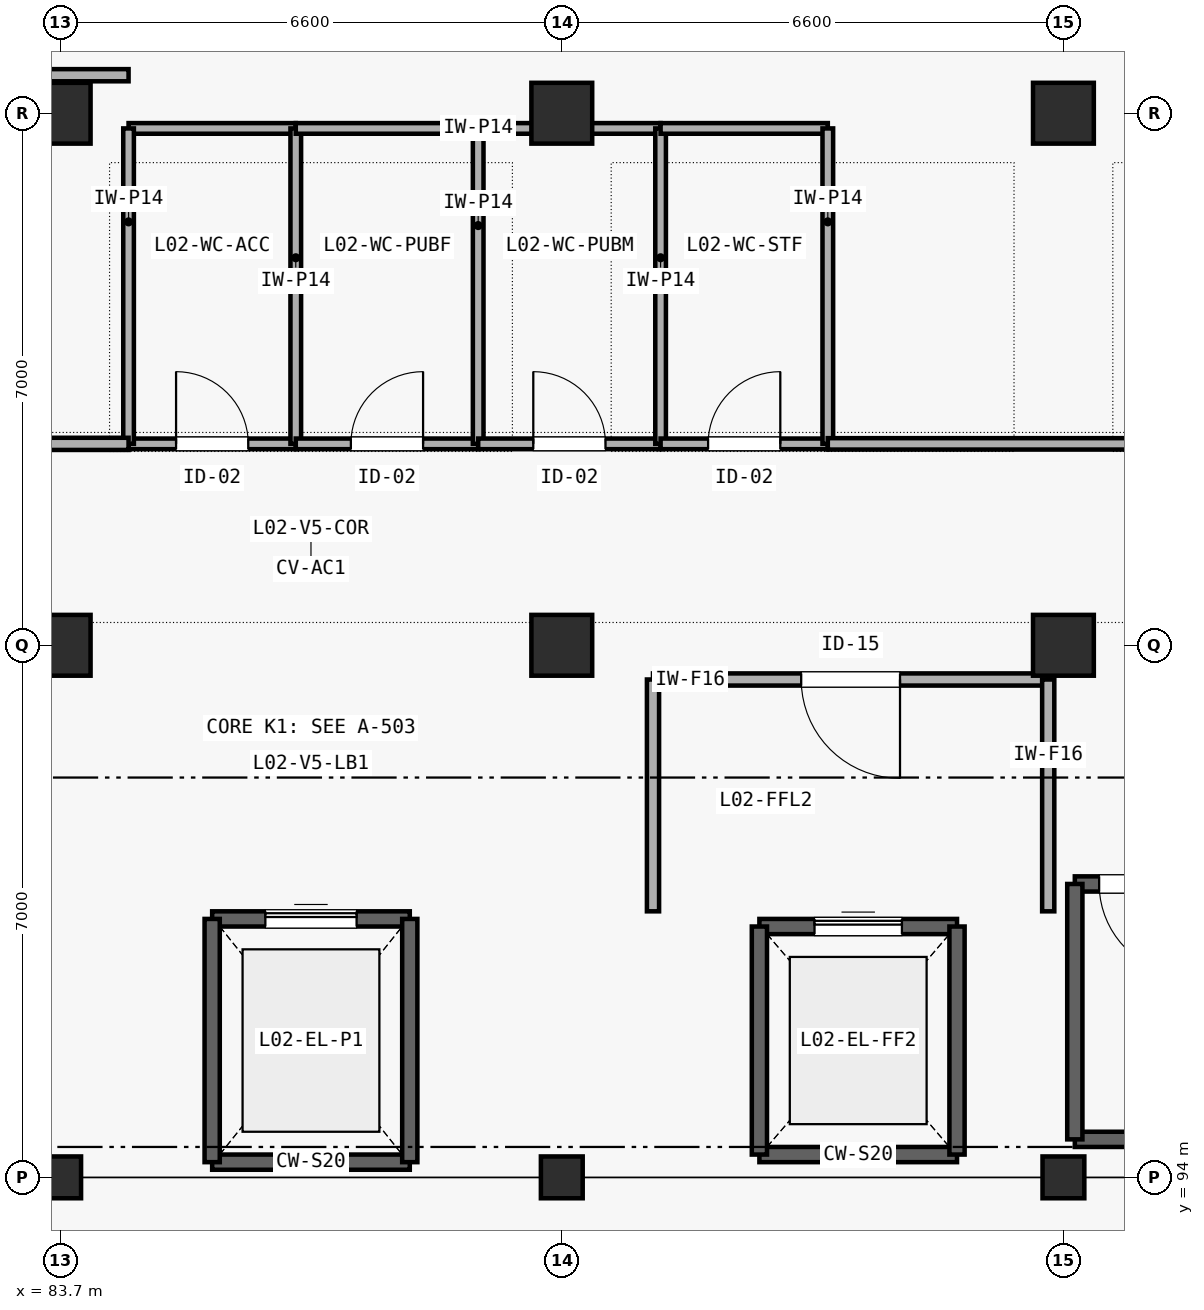
"""IFC4 building model, lengths in metres.
Left out: names, types, materials, properties, quantities, classifications, styles, units other than length and angle.
Written with IfcOpenShell. Run it as: python <this file> out.ifc"""

import sys

from ifc_helpers import new_model, si_unit, direction, frame, frame_2d, origin, origin_2d, place, context, subcontext, project, spatial, rectangle, extrude, element, fill, save


model = new_model("IFC4")
c1 = context("Model", 3, precision=1e-05, world=origin(), true_north=direction((0.0, 1.0)))
c2 = subcontext(c1, "Body", "Model", "MODEL_VIEW")
j1 = project(units=[si_unit("LENGTHUNIT", "METRE"), si_unit("PLANEANGLEUNIT", "RADIAN")], contexts=[c1])
p1 = place(None, origin())
s1 = spatial("IfcSite", under=j1, at=p1, CompositionType="ELEMENT")
p2 = place(p1, origin())
s2 = spatial("IfcBuilding", under=s1, at=p2, CompositionType="ELEMENT")
p3 = place(p2, frame((0.0, 0.0, 8.4)))
s3 = spatial("IfcBuildingStorey", under=s2, at=p3, CompositionType="ELEMENT", Elevation=8.4)
p4 = place(p3, frame((83.7, 94.0, 0.0), z_axis=(0.0, 0.0, 1.0), x_axis=(1.0, 0.0, 0.0)))
e1 = element("IfcColumn", 1, at=p4, inside=s3, PredefinedType="COLUMN", context=c2, shape_type="SweptSolid", body=[
    extrude(rectangle(XDim=0.55, YDim=0.55, at=origin_2d()), origin(), (0.0, 0.0, 1.0), 4.2),
])
for number, where, z_axis, x_axis in (
    (2, (83.7, 101.0, 0.0), (0.0, 0.0, 1.0), (1.0, 0.0, 0.0)),
    (3, (83.7, 108.0, 0.0), (0.0, 0.0, 1.0), (1.0, 0.0, 0.0)),
):
    element("IfcColumn", number, at=place(p3, frame(where, z_axis=z_axis, x_axis=x_axis)), inside=s3, PredefinedType="COLUMN", context=c2, shape_type="SweptSolid", body=[
        extrude(rectangle(XDim=0.8, YDim=0.8, at=origin_2d()), origin(), (0.0, 0.0, 1.0), 4.2),
    ])
p5 = place(p3, frame((90.3, 94.0, 0.0), z_axis=(0.0, 0.0, 1.0), x_axis=(1.0, 0.0, 0.0)))
e4 = element("IfcColumn", 4, at=p5, inside=s3, PredefinedType="COLUMN", context=c2, shape_type="SweptSolid", body=[
    extrude(rectangle(XDim=0.55, YDim=0.55, at=origin_2d()), origin(), (0.0, 0.0, 1.0), 4.2),
])
for number, where, z_axis, x_axis in (
    (5, (90.3, 101.0, 0.0), (0.0, 0.0, 1.0), (1.0, 0.0, 0.0)),
    (6, (90.3, 108.0, 0.0), (0.0, 0.0, 1.0), (1.0, 0.0, 0.0)),
):
    element("IfcColumn", number, at=place(p3, frame(where, z_axis=z_axis, x_axis=x_axis)), inside=s3, PredefinedType="COLUMN", context=c2, shape_type="SweptSolid", body=[
        extrude(rectangle(XDim=0.8, YDim=0.8, at=origin_2d()), origin(), (0.0, 0.0, 1.0), 4.2),
    ])
p6 = place(p3, frame((96.9, 94.0, 0.0), z_axis=(0.0, 0.0, 1.0), x_axis=(1.0, 0.0, 0.0)))
e7 = element("IfcColumn", 7, at=p6, inside=s3, PredefinedType="COLUMN", context=c2, shape_type="SweptSolid", body=[
    extrude(rectangle(XDim=0.55, YDim=0.55, at=origin_2d()), origin(), (0.0, 0.0, 1.0), 4.2),
])
for number, where, z_axis, x_axis in (
    (8, (96.9, 101.0, 0.0), (0.0, 0.0, 1.0), (1.0, 0.0, 0.0)),
    (9, (96.9, 108.0, 0.0), (0.0, 0.0, 1.0), (1.0, 0.0, 0.0)),
):
    element("IfcColumn", number, at=place(p3, frame(where, z_axis=z_axis, x_axis=x_axis)), inside=s3, PredefinedType="COLUMN", context=c2, shape_type="SweptSolid", body=[
        extrude(rectangle(XDim=0.8, YDim=0.8, at=origin_2d()), origin(), (0.0, 0.0, 1.0), 4.2),
    ])
p7 = place(p3, frame((97.05, 94.5, 0.0), z_axis=(0.0, 0.0, 1.0), x_axis=(1.0, 0.0, 0.0)))
e10 = element("IfcWall", 10, at=p7, inside=s3, PredefinedType="SHEAR", context=c2, shape_type="SweptSolid", body=[
    extrude(rectangle(XDim=6.3, YDim=0.2, at=frame_2d((3.15, 0.0))), origin(), (0.0, 0.0, 1.0), 4.2),
])
p8 = place(p3, frame((97.05, 97.86, 0.0), z_axis=(0.0, 0.0, 1.0), x_axis=(1.0, 0.0, 0.0)))
e11 = element("IfcWall", 11, at=p8, inside=s3, PredefinedType="SHEAR", context=c2, shape_type="SweptSolid", body=[
    extrude(rectangle(XDim=6.3, YDim=0.2, at=frame_2d((3.15, 0.0))), origin(), (0.0, 0.0, 1.0), 4.2),
])
p9 = place(p8, frame((0.32, 0.0, 0.0)))
e12 = element("IfcOpeningElement", 12, at=p9, cuts=e11, PredefinedType="OPENING", context=c2, shape_type="SweptSolid", body=[
    extrude(rectangle(XDim=1.2, YDim=2.15, at=frame_2d((0.6, 1.075))), frame((0.0, 0.11, 0.0), z_axis=(0.0, -1.0, 0.0), x_axis=(1.0, 0.0, 0.0)), (0.0, 0.0, 1.0), 0.22),
])
p10 = place(p3, frame((97.05, 94.5, 0.0), z_axis=(0.0, 0.0, 1.0), x_axis=(0.0, 1.0, 0.0)))
e13 = element("IfcWall", 13, at=p10, inside=s3, PredefinedType="SHEAR", context=c2, shape_type="SweptSolid", body=[
    extrude(rectangle(XDim=3.36, YDim=0.2, at=frame_2d((1.68, 0.0))), origin(), (0.0, 0.0, 1.0), 4.2),
])
p11 = place(p3, frame((92.9, 94.3, 0.0), z_axis=(0.0, 0.0, 1.0), x_axis=(1.0, 0.0, 0.0)))
e14 = element("IfcWall", 14, at=p11, inside=s3, PredefinedType="SHEAR", context=c2, shape_type="SweptSolid", body=[
    extrude(rectangle(XDim=2.6, YDim=0.2, at=frame_2d((1.3, 0.0))), origin(), (0.0, 0.0, 1.0), 4.2),
])
p12 = place(p3, frame((92.9, 97.3, 0.0), z_axis=(0.0, 0.0, 1.0), x_axis=(1.0, 0.0, 0.0)))
e15 = element("IfcWall", 15, at=p12, inside=s3, PredefinedType="SHEAR", context=c2, shape_type="SweptSolid", body=[
    extrude(rectangle(XDim=2.6, YDim=0.2, at=frame_2d((1.3, 0.0))), origin(), (0.0, 0.0, 1.0), 4.2),
])
p13 = place(p12, frame((0.725, 0.0, 0.0)))
e16 = element("IfcOpeningElement", 16, at=p13, cuts=e15, PredefinedType="OPENING", context=c2, shape_type="SweptSolid", body=[
    extrude(rectangle(XDim=1.15, YDim=2.2, at=frame_2d((0.575, 1.1))), frame((0.0, 0.11, 0.0), z_axis=(0.0, -1.0, 0.0), x_axis=(1.0, 0.0, 0.0)), (0.0, 0.0, 1.0), 0.22),
])
for number, where, z_axis, x_axis in (
    (17, (92.9, 94.3, 0.0), (0.0, 0.0, 1.0), (0.0, 1.0, 0.0)),
    (18, (95.5, 94.3, 0.0), (0.0, 0.0, 1.0), (0.0, 1.0, 0.0)),
):
    element("IfcWall", number, at=place(p3, frame(where, z_axis=z_axis, x_axis=x_axis)), inside=s3, PredefinedType="SHEAR", context=c2, shape_type="SweptSolid", body=[
        extrude(rectangle(XDim=3.0, YDim=0.2, at=frame_2d((1.5, 0.0))), origin(), (0.0, 0.0, 1.0), 4.2),
    ])
p14 = place(p3, frame((85.7, 94.2, 0.0), z_axis=(0.0, 0.0, 1.0), x_axis=(1.0, 0.0, 0.0)))
e19 = element("IfcWall", 19, at=p14, inside=s3, PredefinedType="SHEAR", context=c2, shape_type="SweptSolid", body=[
    extrude(rectangle(XDim=2.6, YDim=0.2, at=frame_2d((1.3, 0.0))), origin(), (0.0, 0.0, 1.0), 4.2),
])
p15 = place(p3, frame((85.7, 97.4, 0.0), z_axis=(0.0, 0.0, 1.0), x_axis=(1.0, 0.0, 0.0)))
e20 = element("IfcWall", 20, at=p15, inside=s3, PredefinedType="SHEAR", context=c2, shape_type="SweptSolid", body=[
    extrude(rectangle(XDim=2.6, YDim=0.2, at=frame_2d((1.3, 0.0))), origin(), (0.0, 0.0, 1.0), 4.2),
])
p16 = place(p15, frame((0.7, 0.0, 0.0)))
e21 = element("IfcOpeningElement", 21, at=p16, cuts=e20, PredefinedType="OPENING", context=c2, shape_type="SweptSolid", body=[
    extrude(rectangle(XDim=1.2, YDim=2.2, at=frame_2d((0.6, 1.1))), frame((0.0, 0.11, 0.0), z_axis=(0.0, -1.0, 0.0), x_axis=(1.0, 0.0, 0.0)), (0.0, 0.0, 1.0), 0.22),
])
for number, where, z_axis, x_axis in (
    (22, (85.7, 94.2, 0.0), (0.0, 0.0, 1.0), (0.0, 1.0, 0.0)),
    (23, (88.3, 94.2, 0.0), (0.0, 0.0, 1.0), (0.0, 1.0, 0.0)),
):
    element("IfcWall", number, at=place(p3, frame(where, z_axis=z_axis, x_axis=x_axis)), inside=s3, PredefinedType="SHEAR", context=c2, shape_type="SweptSolid", body=[
        extrude(rectangle(XDim=3.2, YDim=0.2, at=frame_2d((1.6, 0.0))), origin(), (0.0, 0.0, 1.0), 4.2),
    ])
p17 = place(p3, frame((91.5, 100.55, 0.0), z_axis=(0.0, 0.0, 1.0), x_axis=(1.0, 0.0, 0.0)))
e24 = element("IfcWall", 24, at=p17, inside=s3, PredefinedType="SOLIDWALL", context=c2, shape_type="SweptSolid", body=[
    extrude(rectangle(XDim=5.2, YDim=0.16, at=frame_2d((2.6, 0.0))), origin(), (0.0, 0.0, 1.0), 3.9),
])
p18 = place(p17, frame((1.95, 0.0, 0.0)))
e25 = element("IfcOpeningElement", 25, at=p18, cuts=e24, PredefinedType="OPENING", context=c2, shape_type="SweptSolid", body=[
    extrude(rectangle(XDim=1.3, YDim=2.15, at=frame_2d((0.65, 1.075))), frame((0.0, 0.09, 0.0), z_axis=(0.0, -1.0, 0.0), x_axis=(1.0, 0.0, 0.0)), (0.0, 0.0, 1.0), 0.18),
])
p19 = place(p3, frame((91.5, 97.5, 0.0), z_axis=(0.0, 0.0, 1.0), x_axis=(0.0, 1.0, 0.0)))
e26 = element("IfcWall", 26, at=p19, inside=s3, PredefinedType="SOLIDWALL", context=c2, shape_type="SweptSolid", body=[
    extrude(rectangle(XDim=3.05, YDim=0.16, at=frame_2d((1.525, 0.0))), origin(), (0.0, 0.0, 1.0), 3.9),
])
p20 = place(p3, frame((96.7, 97.5, 0.0), z_axis=(0.0, 0.0, 1.0), x_axis=(0.0, 1.0, 0.0)))
e27 = element("IfcWall", 27, at=p20, inside=s3, PredefinedType="SOLIDWALL", context=c2, shape_type="SweptSolid", body=[
    extrude(rectangle(XDim=3.05, YDim=0.16, at=frame_2d((1.525, 0.0))), origin(), (0.0, 0.0, 1.0), 3.405),
])
p21 = place(p3, frame((84.6, 103.65, 0.0), z_axis=(0.0, 0.0, 1.0), x_axis=(1.0, 0.0, 0.0)))
e28 = element("IfcWall", 28, at=p21, inside=s3, PredefinedType="PLUMBINGWALL", context=c2, shape_type="SweptSolid", body=[
    extrude(rectangle(XDim=2.2, YDim=0.14, at=frame_2d((1.1, 0.0))), origin(), (0.0, 0.0, 1.0), 3.9),
])
p22 = place(p21, frame((0.625, 0.0, 0.0)))
e29 = element("IfcOpeningElement", 29, at=p22, cuts=e28, PredefinedType="OPENING", context=c2, shape_type="SweptSolid", body=[
    extrude(rectangle(XDim=0.95, YDim=2.1, at=frame_2d((0.475, 1.05))), frame((0.0, 0.08, 0.0), z_axis=(0.0, -1.0, 0.0), x_axis=(1.0, 0.0, 0.0)), (0.0, 0.0, 1.0), 0.16),
])
p23 = place(p3, frame((84.6, 107.8, 0.0), z_axis=(0.0, 0.0, 1.0), x_axis=(1.0, 0.0, 0.0)))
e30 = element("IfcWall", 30, at=p23, inside=s3, PredefinedType="PLUMBINGWALL", context=c2, shape_type="SweptSolid", body=[
    extrude(rectangle(XDim=2.2, YDim=0.14, at=frame_2d((1.1, 0.0))), origin(), (0.0, 0.0, 1.0), 3.365),
])
for number, where, z_axis, x_axis in (
    (31, (84.6, 103.65, 0.0), (0.0, 0.0, 1.0), (0.0, 1.0, 0.0)),
    (32, (86.8, 103.65, 0.0), (0.0, 0.0, 1.0), (0.0, 1.0, 0.0)),
):
    element("IfcWall", number, at=place(p3, frame(where, z_axis=z_axis, x_axis=x_axis)), inside=s3, PredefinedType="PLUMBINGWALL", context=c2, shape_type="SweptSolid", body=[
        extrude(rectangle(XDim=4.15, YDim=0.14, at=frame_2d((2.075, 0.0))), origin(), (0.0, 0.0, 1.0), 3.9),
    ])
p24 = place(p3, frame((86.8, 103.65, 0.0), z_axis=(0.0, 0.0, 1.0), x_axis=(1.0, 0.0, 0.0)))
e33 = element("IfcWall", 33, at=p24, inside=s3, PredefinedType="PLUMBINGWALL", context=c2, shape_type="SweptSolid", body=[
    extrude(rectangle(XDim=2.4, YDim=0.14, at=frame_2d((1.2, 0.0))), origin(), (0.0, 0.0, 1.0), 3.9),
])
p25 = place(p24, frame((0.725, 0.0, 0.0)))
e34 = element("IfcOpeningElement", 34, at=p25, cuts=e33, PredefinedType="OPENING", context=c2, shape_type="SweptSolid", body=[
    extrude(rectangle(XDim=0.95, YDim=2.1, at=frame_2d((0.475, 1.05))), frame((0.0, 0.08, 0.0), z_axis=(0.0, -1.0, 0.0), x_axis=(1.0, 0.0, 0.0)), (0.0, 0.0, 1.0), 0.16),
])
p26 = place(p3, frame((86.8, 107.8, 0.0), z_axis=(0.0, 0.0, 1.0), x_axis=(1.0, 0.0, 0.0)))
e35 = element("IfcWall", 35, at=p26, inside=s3, PredefinedType="PLUMBINGWALL", context=c2, shape_type="SweptSolid", body=[
    extrude(rectangle(XDim=2.4, YDim=0.14, at=frame_2d((1.2, 0.0))), origin(), (0.0, 0.0, 1.0), 3.365),
])
p27 = place(p3, frame((89.2, 103.65, 0.0), z_axis=(0.0, 0.0, 1.0), x_axis=(0.0, 1.0, 0.0)))
e36 = element("IfcWall", 36, at=p27, inside=s3, PredefinedType="PLUMBINGWALL", context=c2, shape_type="SweptSolid", body=[
    extrude(rectangle(XDim=4.15, YDim=0.14, at=frame_2d((2.075, 0.0))), origin(), (0.0, 0.0, 1.0), 3.9),
])
p28 = place(p3, frame((89.2, 103.65, 0.0), z_axis=(0.0, 0.0, 1.0), x_axis=(1.0, 0.0, 0.0)))
e37 = element("IfcWall", 37, at=p28, inside=s3, PredefinedType="PLUMBINGWALL", context=c2, shape_type="SweptSolid", body=[
    extrude(rectangle(XDim=2.4, YDim=0.14, at=frame_2d((1.2, 0.0))), origin(), (0.0, 0.0, 1.0), 3.9),
])
p29 = place(p28, frame((0.725, 0.0, 0.0)))
e38 = element("IfcOpeningElement", 38, at=p29, cuts=e37, PredefinedType="OPENING", context=c2, shape_type="SweptSolid", body=[
    extrude(rectangle(XDim=0.95, YDim=2.1, at=frame_2d((0.475, 1.05))), frame((0.0, 0.08, 0.0), z_axis=(0.0, -1.0, 0.0), x_axis=(1.0, 0.0, 0.0)), (0.0, 0.0, 1.0), 0.16),
])
p30 = place(p3, frame((89.2, 107.8, 0.0), z_axis=(0.0, 0.0, 1.0), x_axis=(1.0, 0.0, 0.0)))
e39 = element("IfcWall", 39, at=p30, inside=s3, PredefinedType="PLUMBINGWALL", context=c2, shape_type="SweptSolid", body=[
    extrude(rectangle(XDim=2.4, YDim=0.14, at=frame_2d((1.2, 0.0))), origin(), (0.0, 0.0, 1.0), 3.365),
])
p31 = place(p3, frame((91.6, 103.65, 0.0), z_axis=(0.0, 0.0, 1.0), x_axis=(0.0, 1.0, 0.0)))
e40 = element("IfcWall", 40, at=p31, inside=s3, PredefinedType="PLUMBINGWALL", context=c2, shape_type="SweptSolid", body=[
    extrude(rectangle(XDim=4.15, YDim=0.14, at=frame_2d((2.075, 0.0))), origin(), (0.0, 0.0, 1.0), 3.9),
])
p32 = place(p3, frame((91.6, 103.65, 0.0), z_axis=(0.0, 0.0, 1.0), x_axis=(1.0, 0.0, 0.0)))
e41 = element("IfcWall", 41, at=p32, inside=s3, PredefinedType="PLUMBINGWALL", context=c2, shape_type="SweptSolid", body=[
    extrude(rectangle(XDim=2.2, YDim=0.14, at=frame_2d((1.1, 0.0))), origin(), (0.0, 0.0, 1.0), 3.9),
])
p33 = place(p32, frame((0.625, 0.0, 0.0)))
e42 = element("IfcOpeningElement", 42, at=p33, cuts=e41, PredefinedType="OPENING", context=c2, shape_type="SweptSolid", body=[
    extrude(rectangle(XDim=0.95, YDim=2.1, at=frame_2d((0.475, 1.05))), frame((0.0, 0.08, 0.0), z_axis=(0.0, -1.0, 0.0), x_axis=(1.0, 0.0, 0.0)), (0.0, 0.0, 1.0), 0.16),
])
p34 = place(p3, frame((91.6, 107.8, 0.0), z_axis=(0.0, 0.0, 1.0), x_axis=(1.0, 0.0, 0.0)))
e43 = element("IfcWall", 43, at=p34, inside=s3, PredefinedType="PLUMBINGWALL", context=c2, shape_type="SweptSolid", body=[
    extrude(rectangle(XDim=2.2, YDim=0.14, at=frame_2d((1.1, 0.0))), origin(), (0.0, 0.0, 1.0), 3.365),
])
p35 = place(p3, frame((93.8, 103.65, 0.0), z_axis=(0.0, 0.0, 1.0), x_axis=(0.0, 1.0, 0.0)))
e44 = element("IfcWall", 44, at=p35, inside=s3, PredefinedType="PLUMBINGWALL", context=c2, shape_type="SweptSolid", body=[
    extrude(rectangle(XDim=4.15, YDim=0.14, at=frame_2d((2.075, 0.0))), origin(), (0.0, 0.0, 1.0), 3.9),
])
p36 = place(p3, frame((75.5, 103.65, 0.0), z_axis=(0.0, 0.0, 1.0), x_axis=(1.0, 0.0, 0.0)))
e45 = element("IfcWall", 45, at=p36, inside=s3, PredefinedType="SOLIDWALL", context=c2, shape_type="SweptSolid", body=[
    extrude(rectangle(XDim=9.1, YDim=0.16, at=frame_2d((4.55, 0.0))), origin(), (0.0, 0.0, 1.0), 3.9),
])
p37 = place(p36, frame((4.0, 0.0, 0.0)))
e46 = element("IfcOpeningElement", 46, at=p37, cuts=e45, PredefinedType="OPENING", context=c2, shape_type="SweptSolid", body=[
    extrude(rectangle(XDim=1.1, YDim=2.2, at=frame_2d((0.55, 1.1))), frame((0.0, 0.09, 0.0), z_axis=(0.0, -1.0, 0.0), x_axis=(1.0, 0.0, 0.0)), (0.0, 0.0, 1.0), 0.18),
])
p38 = place(p3, frame((75.5, 108.5, 0.0), z_axis=(0.0, 0.0, 1.0), x_axis=(1.0, 0.0, 0.0)))
e47 = element("IfcWall", 47, at=p38, inside=s3, PredefinedType="SOLIDWALL", context=c2, shape_type="SweptSolid", body=[
    extrude(rectangle(XDim=9.1, YDim=0.16, at=frame_2d((4.55, 0.0))), origin(), (0.0, 0.0, 1.0), 3.9),
])
p39 = place(p3, frame((93.8, 103.65, 0.0), z_axis=(0.0, 0.0, 1.0), x_axis=(1.0, 0.0, 0.0)))
e48 = element("IfcWall", 48, at=p39, inside=s3, PredefinedType="PARTITIONING", context=c2, shape_type="SweptSolid", body=[
    extrude(rectangle(XDim=14.0, YDim=0.15, at=frame_2d((7.0, 0.0))), origin(), (0.0, 0.0, 1.0), 3.9),
])
p40 = place(p39, frame((6.425, 0.0, 0.0)))
e49 = element("IfcOpeningElement", 49, at=p40, cuts=e48, PredefinedType="OPENING", context=c2, shape_type="SweptSolid", body=[
    extrude(rectangle(XDim=1.15, YDim=2.15, at=frame_2d((0.575, 1.075))), frame((0.0, 0.085, 0.0), z_axis=(0.0, -1.0, 0.0), x_axis=(1.0, 0.0, 0.0)), (0.0, 0.0, 1.0), 0.17),
])
p41 = place(p9, frame((1.2, 0.0, 0.0), z_axis=(0.0, 0.0, 1.0), x_axis=(-1.0, 0.0, 0.0)))
e50 = element("IfcDoor", 50, at=p41, inside=s3, OperationType="SINGLE_SWING_LEFT", PredefinedType="DOOR", context=c2, shape_type="SweptSolid", body=[
    extrude(rectangle(XDim=1.2, YDim=2.15, at=frame_2d((0.6, 1.075))), frame((0.0, 0.025, 0.0), z_axis=(0.0, -1.0, 0.0), x_axis=(1.0, 0.0, 0.0)), (0.0, 0.0, 1.0), 0.05),
])
fill(e12, e50)
p42 = place(p13, origin())
e51 = element("IfcDoor", 51, at=p42, inside=s3, OperationType="SLIDING_TO_LEFT", PredefinedType="DOOR", context=c2, shape_type="SweptSolid", body=[
    extrude(rectangle(XDim=1.15, YDim=2.2, at=frame_2d((0.575, 1.1))), frame((0.0, 0.025, 0.0), z_axis=(0.0, -1.0, 0.0), x_axis=(1.0, 0.0, 0.0)), (0.0, 0.0, 1.0), 0.05),
])
fill(e16, e51)
p43 = place(p16, origin())
e52 = element("IfcDoor", 52, at=p43, inside=s3, OperationType="SLIDING_TO_LEFT", PredefinedType="DOOR", context=c2, shape_type="SweptSolid", body=[
    extrude(rectangle(XDim=1.2, YDim=2.2, at=frame_2d((0.6, 1.1))), frame((0.0, 0.025, 0.0), z_axis=(0.0, -1.0, 0.0), x_axis=(1.0, 0.0, 0.0)), (0.0, 0.0, 1.0), 0.05),
])
fill(e21, e52)
p44 = place(p18, frame((1.3, 0.0, 0.0), z_axis=(0.0, 0.0, 1.0), x_axis=(-1.0, 0.0, 0.0)))
e53 = element("IfcDoor", 53, at=p44, inside=s3, OperationType="SINGLE_SWING_LEFT", PredefinedType="DOOR", context=c2, shape_type="SweptSolid", body=[
    extrude(rectangle(XDim=1.3, YDim=2.15, at=frame_2d((0.65, 1.075))), frame((0.0, 0.025, 0.0), z_axis=(0.0, -1.0, 0.0), x_axis=(1.0, 0.0, 0.0)), (0.0, 0.0, 1.0), 0.05),
])
fill(e25, e53)
p45 = place(p22, origin())
e54 = element("IfcDoor", 54, at=p45, inside=s3, OperationType="SINGLE_SWING_LEFT", PredefinedType="DOOR", context=c2, shape_type="SweptSolid", body=[
    extrude(rectangle(XDim=0.95, YDim=2.1, at=frame_2d((0.475, 1.05))), frame((0.0, 0.025, 0.0), z_axis=(0.0, -1.0, 0.0), x_axis=(1.0, 0.0, 0.0)), (0.0, 0.0, 1.0), 0.05),
])
fill(e29, e54)
p46 = place(p25, origin())
e55 = element("IfcDoor", 55, at=p46, inside=s3, OperationType="SINGLE_SWING_RIGHT", PredefinedType="DOOR", context=c2, shape_type="SweptSolid", body=[
    extrude(rectangle(XDim=0.95, YDim=2.1, at=frame_2d((0.475, 1.05))), frame((0.0, 0.025, 0.0), z_axis=(0.0, -1.0, 0.0), x_axis=(1.0, 0.0, 0.0)), (0.0, 0.0, 1.0), 0.05),
])
fill(e34, e55)
p47 = place(p29, origin())
e56 = element("IfcDoor", 56, at=p47, inside=s3, OperationType="SINGLE_SWING_LEFT", PredefinedType="DOOR", context=c2, shape_type="SweptSolid", body=[
    extrude(rectangle(XDim=0.95, YDim=2.1, at=frame_2d((0.475, 1.05))), frame((0.0, 0.025, 0.0), z_axis=(0.0, -1.0, 0.0), x_axis=(1.0, 0.0, 0.0)), (0.0, 0.0, 1.0), 0.05),
])
fill(e38, e56)
p48 = place(p33, origin())
e57 = element("IfcDoor", 57, at=p48, inside=s3, OperationType="SINGLE_SWING_RIGHT", PredefinedType="DOOR", context=c2, shape_type="SweptSolid", body=[
    extrude(rectangle(XDim=0.95, YDim=2.1, at=frame_2d((0.475, 1.05))), frame((0.0, 0.025, 0.0), z_axis=(0.0, -1.0, 0.0), x_axis=(1.0, 0.0, 0.0)), (0.0, 0.0, 1.0), 0.05),
])
fill(e42, e57)
save(model, sys.argv[1])
